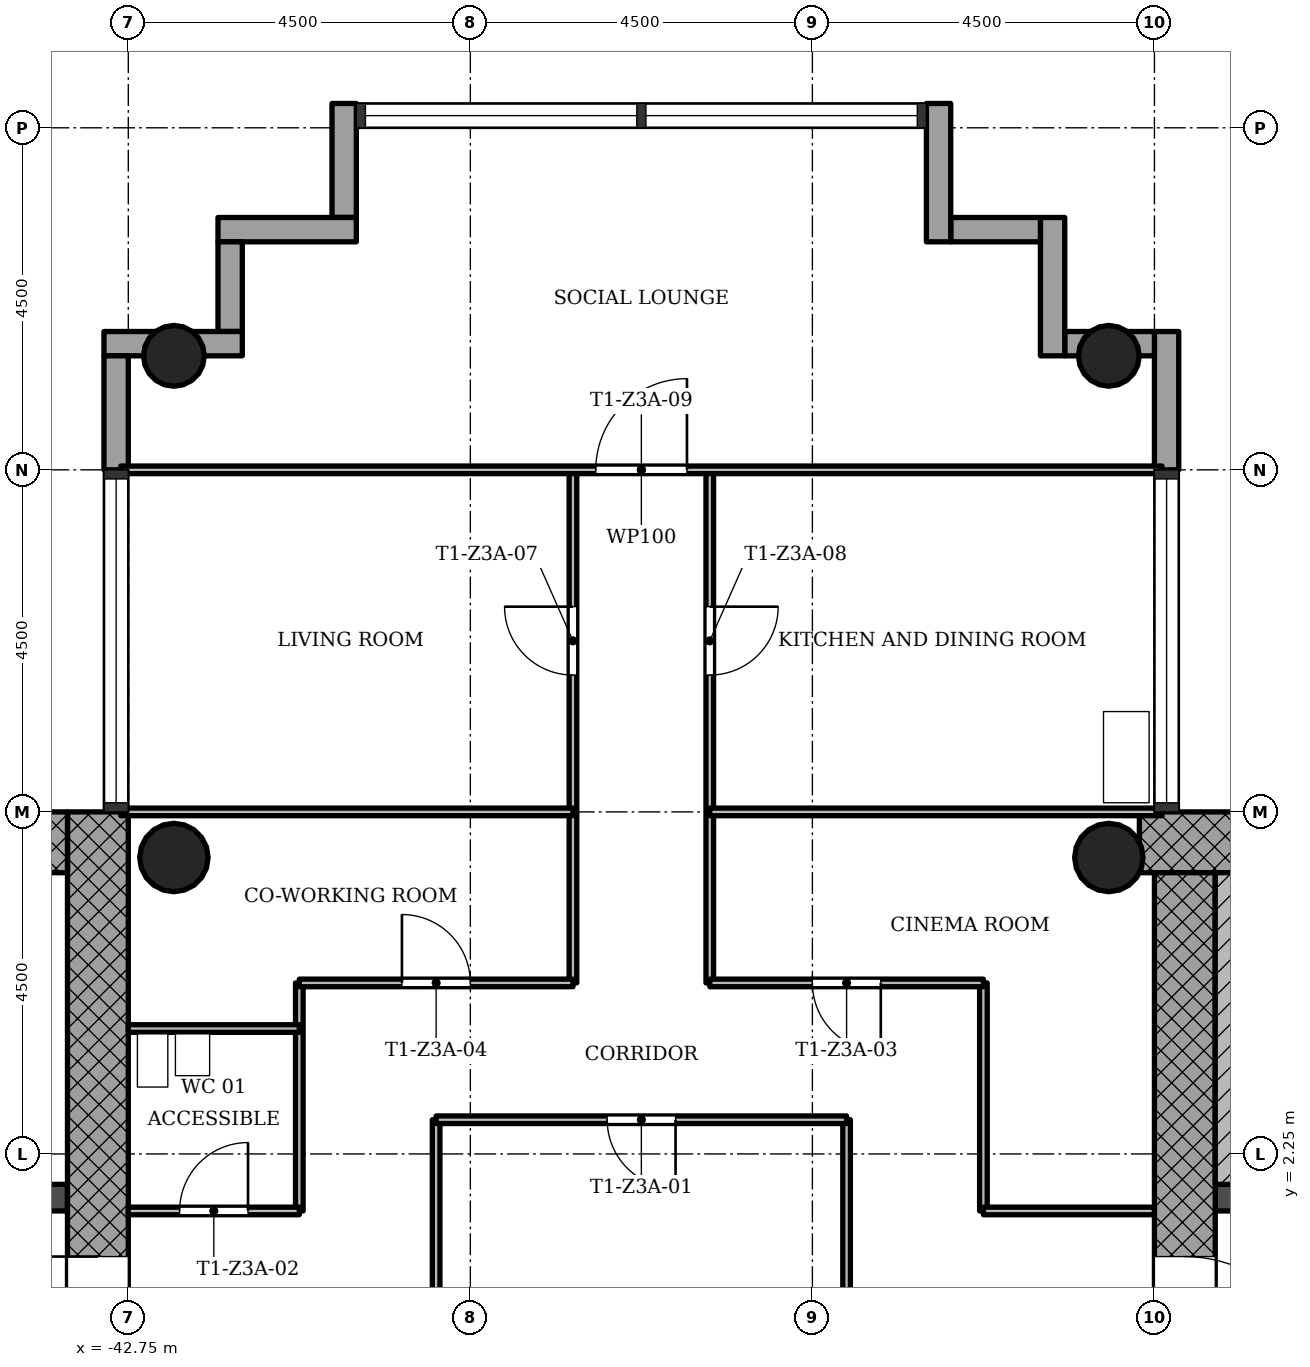
"""IFC4 building model, lengths in metres.
Left out: names, types, materials, properties, quantities, classifications, styles, units other than length and angle.
Written with IfcOpenShell. Run it as: python <this file> out.ifc"""

import sys

from ifc_helpers import new_model, si_unit, direction, frame, frame_2d, origin, origin_2d, place, context, subcontext, project, spatial, rectangle, hollow_circle, extrude, element, fill, save


model = new_model("IFC4")
c1 = context("Model", 3, precision=1e-05, world=origin(), true_north=direction((0.0, 1.0)))
c2 = subcontext(c1, "Body", "Model", "MODEL_VIEW")
j1 = project(units=[si_unit("LENGTHUNIT", "METRE"), si_unit("PLANEANGLEUNIT", "RADIAN")], contexts=[c1])
p1 = place(None, origin())
s1 = spatial("IfcSite", under=j1, at=p1, CompositionType="ELEMENT")
p2 = place(p1, origin())
s2 = spatial("IfcBuilding", under=s1, at=p2, CompositionType="ELEMENT")
p3 = place(p2, frame((0.0, 0.0, 140.5)))
s3 = spatial("IfcBuildingStorey", under=s2, at=p3, CompositionType="ELEMENT", Elevation=140.5)
p4 = place(p3, frame((-20.652, 6.35, 0.0), z_axis=(0.0, 0.0, 1.0), x_axis=(-1.0, 0.0, 0.0)))
e1 = element("IfcWall", 1, at=p4, inside=s3, PredefinedType="SHEAR", context=c2, shape_type="SweptSolid", body=[
    extrude(rectangle(XDim=8.796, YDim=0.8, at=frame_2d((4.398, 0.0))), origin(), (0.0, 0.0, 1.0), 3.4),
])
p5 = place(p3, frame((-28.85, 5.95, 0.0), z_axis=(0.0, 0.0, 1.0), x_axis=(0.0, -1.0, 0.0)))
e2 = element("IfcWall", 2, at=p5, inside=s3, PredefinedType="SHEAR", context=c2, shape_type="SweptSolid", body=[
    extrude(rectangle(XDim=12.7, YDim=0.8, at=frame_2d((6.35, 0.0))), origin(), (0.0, 0.0, 1.0), 3.4),
])
p6 = place(p5, frame((5.05, 0.0, 0.0)))
e3 = element("IfcOpeningElement", 3, at=p6, cuts=e2, PredefinedType="OPENING", context=c2, shape_type="SweptSolid", body=[
    extrude(rectangle(XDim=1.8, YDim=2.1, at=frame_2d((0.9, 1.05))), frame((0.0, 0.41, 0.0), z_axis=(0.0, -1.0, 0.0), x_axis=(1.0, 0.0, 0.0)), (0.0, 0.0, 1.0), 0.82),
])
p7 = place(p3, frame((-28.45, 1.675, 0.0), z_axis=(0.0, 0.0, 1.0), x_axis=(1.0, 0.0, 0.0)))
e4 = element("IfcWall", 4, at=p7, inside=s3, PredefinedType="SHEAR", context=c2, shape_type="SweptSolid", body=[
    extrude(rectangle(XDim=7.4, YDim=0.35, at=frame_2d((3.7, 0.0))), origin(), (0.0, 0.0, 1.0), 3.4),
])
p8 = place(p7, frame((0.85, 0.0, 0.0)))
e5 = element("IfcOpeningElement", 5, at=p8, cuts=e4, PredefinedType="OPENING", context=c2, shape_type="SweptSolid", body=[
    extrude(rectangle(XDim=0.9, YDim=2.1, at=frame_2d((0.45, 1.05))), frame((0.0, 0.185, 0.0), z_axis=(0.0, -1.0, 0.0), x_axis=(1.0, 0.0, 0.0)), (0.0, 0.0, 1.0), 0.37),
])
p9 = place(p3, frame((-43.15, -5.95, 0.0), z_axis=(0.0, 0.0, 1.0), x_axis=(0.0, 1.0, 0.0)))
e6 = element("IfcWall", 6, at=p9, inside=s3, PredefinedType="SHEAR", context=c2, shape_type="SweptSolid", body=[
    extrude(rectangle(XDim=12.7, YDim=0.8, at=frame_2d((6.35, 0.0))), origin(), (0.0, 0.0, 1.0), 3.4),
])
p10 = place(p9, frame((5.05, 0.0, 0.0)))
e7 = element("IfcOpeningElement", 7, at=p10, cuts=e6, PredefinedType="OPENING", context=c2, shape_type="SweptSolid", body=[
    extrude(rectangle(XDim=1.8, YDim=2.1, at=frame_2d((0.9, 1.05))), frame((0.0, 0.41, 0.0), z_axis=(0.0, -1.0, 0.0), x_axis=(1.0, 0.0, 0.0)), (0.0, 0.0, 1.0), 0.82),
])
p11 = place(p3, frame((-43.55, 6.35, 0.0), z_axis=(0.0, 0.0, 1.0), x_axis=(-1.0, 0.0, 0.0)))
e8 = element("IfcWall", 8, at=p11, inside=s3, PredefinedType="SHEAR", context=c2, shape_type="SweptSolid", body=[
    extrude(rectangle(XDim=8.2, YDim=0.8, at=frame_2d((4.1, 0.0))), origin(), (0.0, 0.0, 1.0), 3.4),
])
p12 = place(p3, frame((-50.95, 1.675, 0.0), z_axis=(0.0, 0.0, 1.0), x_axis=(1.0, 0.0, 0.0)))
e9 = element("IfcWall", 9, at=p12, inside=s3, PredefinedType="SHEAR", context=c2, shape_type="SweptSolid", body=[
    extrude(rectangle(XDim=7.4, YDim=0.35, at=frame_2d((3.7, 0.0))), origin(), (0.0, 0.0, 1.0), 3.4),
])
p13 = place(p12, frame((5.35, 0.0, 0.0)))
e10 = element("IfcOpeningElement", 10, at=p13, cuts=e9, PredefinedType="OPENING", context=c2, shape_type="SweptSolid", body=[
    extrude(rectangle(XDim=1.1, YDim=2.1, at=frame_2d((0.55, 1.05))), frame((0.0, 0.185, 0.0), z_axis=(0.0, -1.0, 0.0), x_axis=(1.0, 0.0, 0.0)), (0.0, 0.0, 1.0), 0.37),
])
p14 = place(p12, frame((1.0, 0.0, 0.0)))
e11 = element("IfcOpeningElement", 11, at=p14, cuts=e9, PredefinedType="OPENING", context=c2, shape_type="SweptSolid", body=[
    extrude(rectangle(XDim=1.1, YDim=2.1, at=frame_2d((0.55, 1.05))), frame((0.0, 0.185, 0.0), z_axis=(0.0, -1.0, 0.0), x_axis=(1.0, 0.0, 0.0)), (0.0, 0.0, 1.0), 0.37),
])
p15 = place(p12, frame((3.3, 0.0, 0.0)))
e12 = element("IfcOpeningElement", 12, at=p15, cuts=e9, PredefinedType="OPENING", context=c2, shape_type="SweptSolid", body=[
    extrude(rectangle(XDim=0.9, YDim=2.1, at=frame_2d((0.45, 1.05))), frame((0.0, 0.185, 0.0), z_axis=(0.0, -1.0, 0.0), x_axis=(1.0, 0.0, 0.0)), (0.0, 0.0, 1.0), 0.37),
])
for number, where, z_axis, x_axis in (
    (13, (-29.85, 12.75, 0.0), (0.0, 0.0, 1.0), (1.0, 0.0, 0.0)),
    (14, (-42.15, 12.75, 0.0), (0.0, 0.0, 1.0), (1.0, 0.0, 0.0)),
):
    element("IfcColumn", number, at=place(p3, frame(where, z_axis=z_axis, x_axis=x_axis)), inside=s3, PredefinedType="COLUMN", context=c2, shape_type="SweptSolid", body=[
        extrude(hollow_circle(Radius=0.4, WallThickness=0.028, at=origin_2d()), origin(), (0.0, 0.0, 1.0), 3.4),
    ])
for number, where, z_axis, x_axis in (
    (15, (-29.85, 6.15, 0.0), (0.0, 0.0, 1.0), (1.0, 0.0, 0.0)),
    (16, (-42.15, 6.15, 0.0), (0.0, 0.0, 1.0), (1.0, 0.0, 0.0)),
):
    element("IfcColumn", number, at=place(p3, frame(where, z_axis=z_axis, x_axis=x_axis)), inside=s3, PredefinedType="COLUMN", context=c2, shape_type="SweptSolid", body=[
        extrude(hollow_circle(Radius=0.45, WallThickness=0.032, at=origin_2d()), origin(), (0.0, 0.0, 1.0), 3.4),
    ])
p16 = place(p3, frame((-29.09, 11.25, -0.3), z_axis=(0.0, 0.0, 1.0), x_axis=(0.0, 1.0, 0.0)))
e17 = element("IfcWall", 17, at=p16, inside=s3, PredefinedType="STANDARD", context=c2, shape_type="SweptSolid", body=[
    extrude(rectangle(XDim=1.82, YDim=0.32, at=frame_2d((0.91, 0.0))), origin(), (0.0, 0.0, 1.0), 3.4),
])
p17 = place(p3, frame((-29.25, 12.91, -0.3), z_axis=(0.0, 0.0, 1.0), x_axis=(-1.0, 0.0, 0.0)))
e18 = element("IfcWall", 18, at=p17, inside=s3, PredefinedType="STANDARD", context=c2, shape_type="SweptSolid", body=[
    extrude(rectangle(XDim=1.18, YDim=0.32, at=frame_2d((0.59, 0.0))), origin(), (0.0, 0.0, 1.0), 3.4),
])
p18 = place(p3, frame((-30.59, 12.75, -0.3), z_axis=(0.0, 0.0, 1.0), x_axis=(0.0, 1.0, 0.0)))
e19 = element("IfcWall", 19, at=p18, inside=s3, PredefinedType="STANDARD", context=c2, shape_type="SweptSolid", body=[
    extrude(rectangle(XDim=1.82, YDim=0.32, at=frame_2d((0.91, 0.0))), origin(), (0.0, 0.0, 1.0), 3.4),
])
p19 = place(p3, frame((-30.75, 14.41, -0.3), z_axis=(0.0, 0.0, 1.0), x_axis=(-1.0, 0.0, 0.0)))
e20 = element("IfcWall", 20, at=p19, inside=s3, PredefinedType="STANDARD", context=c2, shape_type="SweptSolid", body=[
    extrude(rectangle(XDim=1.18, YDim=0.32, at=frame_2d((0.59, 0.0))), origin(), (0.0, 0.0, 1.0), 3.4),
])
p20 = place(p3, frame((-32.09, 14.25, -0.3), z_axis=(0.0, 0.0, 1.0), x_axis=(0.0, 1.0, 0.0)))
e21 = element("IfcWall", 21, at=p20, inside=s3, PredefinedType="STANDARD", context=c2, shape_type="SweptSolid", body=[
    extrude(rectangle(XDim=1.82, YDim=0.32, at=frame_2d((0.91, 0.0))), origin(), (0.0, 0.0, 1.0), 3.4),
])
p21 = place(p3, frame((-39.91, 16.07, -0.3), z_axis=(0.0, 0.0, 1.0), x_axis=(0.0, -1.0, 0.0)))
e22 = element("IfcWall", 22, at=p21, inside=s3, PredefinedType="STANDARD", context=c2, shape_type="SweptSolid", body=[
    extrude(rectangle(XDim=1.5, YDim=0.32, at=frame_2d((0.75, 0.0))), origin(), (0.0, 0.0, 1.0), 3.4),
])
p22 = place(p3, frame((-39.75, 14.41, -0.3), z_axis=(0.0, 0.0, 1.0), x_axis=(-1.0, 0.0, 0.0)))
e23 = element("IfcWall", 23, at=p22, inside=s3, PredefinedType="STANDARD", context=c2, shape_type="SweptSolid", body=[
    extrude(rectangle(XDim=1.82, YDim=0.32, at=frame_2d((0.91, 0.0))), origin(), (0.0, 0.0, 1.0), 3.4),
])
p23 = place(p3, frame((-41.41, 14.25, -0.3), z_axis=(0.0, 0.0, 1.0), x_axis=(0.0, -1.0, 0.0)))
e24 = element("IfcWall", 24, at=p23, inside=s3, PredefinedType="STANDARD", context=c2, shape_type="SweptSolid", body=[
    extrude(rectangle(XDim=1.18, YDim=0.32, at=frame_2d((0.59, 0.0))), origin(), (0.0, 0.0, 1.0), 3.4),
])
p24 = place(p3, frame((-41.25, 12.91, -0.3), z_axis=(0.0, 0.0, 1.0), x_axis=(-1.0, 0.0, 0.0)))
e25 = element("IfcWall", 25, at=p24, inside=s3, PredefinedType="STANDARD", context=c2, shape_type="SweptSolid", body=[
    extrude(rectangle(XDim=1.82, YDim=0.32, at=frame_2d((0.91, 0.0))), origin(), (0.0, 0.0, 1.0), 3.4),
])
p25 = place(p3, frame((-42.91, 12.75, -0.3), z_axis=(0.0, 0.0, 1.0), x_axis=(0.0, -1.0, 0.0)))
e26 = element("IfcWall", 26, at=p25, inside=s3, PredefinedType="STANDARD", context=c2, shape_type="SweptSolid", body=[
    extrude(rectangle(XDim=1.5, YDim=0.32, at=frame_2d((0.75, 0.0))), origin(), (0.0, 0.0, 1.0), 3.4),
])
p26 = place(p3, frame((-40.5, 1.5, 0.0), z_axis=(0.0, 0.0, 1.0), x_axis=(0.0, 1.0, 0.0)))
e27 = element("IfcWall", 27, at=p26, inside=s3, PredefinedType="PARTITIONING", context=c2, shape_type="SweptSolid", body=[
    extrude(rectangle(XDim=3.0, YDim=0.1, at=frame_2d((1.5, 0.0))), origin(), (0.0, 0.0, 1.0), 3.0),
])
p27 = place(p3, frame((-38.7, -2.7, 0.0), z_axis=(0.0, 0.0, 1.0), x_axis=(0.0, 1.0, 0.0)))
e28 = element("IfcWall", 28, at=p27, inside=s3, PredefinedType="PARTITIONING", context=c2, shape_type="SweptSolid", body=[
    extrude(rectangle(XDim=5.4, YDim=0.1, at=frame_2d((2.7, 0.0))), origin(), (0.0, 0.0, 1.0), 3.0),
])
p28 = place(p3, frame((-36.9, 4.5, 0.0), z_axis=(0.0, 0.0, 1.0), x_axis=(0.0, 1.0, 0.0)))
e29 = element("IfcWall", 29, at=p28, inside=s3, PredefinedType="PARTITIONING", context=c2, shape_type="SweptSolid", body=[
    extrude(rectangle(XDim=6.75, YDim=0.1, at=frame_2d((3.375, 0.0))), origin(), (0.0, 0.0, 1.0), 3.0),
])
p29 = place(p28, frame((4.05, 0.0, 0.0)))
e30 = element("IfcOpeningElement", 30, at=p29, cuts=e29, PredefinedType="OPENING", context=c2, shape_type="SweptSolid", body=[
    extrude(rectangle(XDim=0.9, YDim=2.1, at=frame_2d((0.45, 1.05))), frame((0.0, 0.06, 0.0), z_axis=(0.0, -1.0, 0.0), x_axis=(1.0, 0.0, 0.0)), (0.0, 0.0, 1.0), 0.12),
])
p30 = place(p3, frame((-35.1, 4.5, 0.0), z_axis=(0.0, 0.0, 1.0), x_axis=(0.0, 1.0, 0.0)))
e31 = element("IfcWall", 31, at=p30, inside=s3, PredefinedType="PARTITIONING", context=c2, shape_type="SweptSolid", body=[
    extrude(rectangle(XDim=6.75, YDim=0.1, at=frame_2d((3.375, 0.0))), origin(), (0.0, 0.0, 1.0), 3.0),
])
p31 = place(p30, frame((4.05, 0.0, 0.0)))
e32 = element("IfcOpeningElement", 32, at=p31, cuts=e31, PredefinedType="OPENING", context=c2, shape_type="SweptSolid", body=[
    extrude(rectangle(XDim=0.9, YDim=2.1, at=frame_2d((0.45, 1.05))), frame((0.0, 0.06, 0.0), z_axis=(0.0, -1.0, 0.0), x_axis=(1.0, 0.0, 0.0)), (0.0, 0.0, 1.0), 0.12),
])
p32 = place(p3, frame((-33.3, -2.7, 0.0), z_axis=(0.0, 0.0, 1.0), x_axis=(0.0, 1.0, 0.0)))
e33 = element("IfcWall", 33, at=p32, inside=s3, PredefinedType="PARTITIONING", context=c2, shape_type="SweptSolid", body=[
    extrude(rectangle(XDim=5.4, YDim=0.1, at=frame_2d((2.7, 0.0))), origin(), (0.0, 0.0, 1.0), 3.0),
])
p33 = place(p3, frame((-31.5, 1.5, 0.0), z_axis=(0.0, 0.0, 1.0), x_axis=(0.0, 1.0, 0.0)))
e34 = element("IfcWall", 34, at=p33, inside=s3, PredefinedType="PARTITIONING", context=c2, shape_type="SweptSolid", body=[
    extrude(rectangle(XDim=3.0, YDim=0.1, at=frame_2d((1.5, 0.0))), origin(), (0.0, 0.0, 1.0), 3.0),
])
p34 = place(p3, frame((-42.75, 1.5, 0.0), z_axis=(0.0, 0.0, 1.0), x_axis=(1.0, 0.0, 0.0)))
e35 = element("IfcWall", 35, at=p34, inside=s3, PredefinedType="PARTITIONING", context=c2, shape_type="SweptSolid", body=[
    extrude(rectangle(XDim=2.25, YDim=0.1, at=frame_2d((1.125, 0.0))), origin(), (0.0, 0.0, 1.0), 3.0),
])
p35 = place(p34, frame((0.675, 0.0, 0.0)))
e36 = element("IfcOpeningElement", 36, at=p35, cuts=e35, PredefinedType="OPENING", context=c2, shape_type="SweptSolid", body=[
    extrude(rectangle(XDim=0.9, YDim=2.1, at=frame_2d((0.45, 1.05))), frame((0.0, 0.06, 0.0), z_axis=(0.0, -1.0, 0.0), x_axis=(1.0, 0.0, 0.0)), (0.0, 0.0, 1.0), 0.12),
])
p36 = place(p3, frame((-31.5, 1.5, 0.0), z_axis=(0.0, 0.0, 1.0), x_axis=(1.0, 0.0, 0.0)))
e37 = element("IfcWall", 37, at=p36, inside=s3, PredefinedType="PARTITIONING", context=c2, shape_type="SweptSolid", body=[
    extrude(rectangle(XDim=2.25, YDim=0.1, at=frame_2d((1.125, 0.0))), origin(), (0.0, 0.0, 1.0), 3.0),
])
p37 = place(p3, frame((-38.7, 2.7, 0.0), z_axis=(0.0, 0.0, 1.0), x_axis=(1.0, 0.0, 0.0)))
e38 = element("IfcWall", 38, at=p37, inside=s3, PredefinedType="PARTITIONING", context=c2, shape_type="SweptSolid", body=[
    extrude(rectangle(XDim=5.4, YDim=0.1, at=frame_2d((2.7, 0.0))), origin(), (0.0, 0.0, 1.0), 3.0),
])
p38 = place(p37, frame((2.25, 0.0, 0.0)))
e39 = element("IfcOpeningElement", 39, at=p38, cuts=e38, PredefinedType="OPENING", context=c2, shape_type="SweptSolid", body=[
    extrude(rectangle(XDim=0.9, YDim=2.1, at=frame_2d((0.45, 1.05))), frame((0.0, 0.06, 0.0), z_axis=(0.0, -1.0, 0.0), x_axis=(1.0, 0.0, 0.0)), (0.0, 0.0, 1.0), 0.12),
])
p39 = place(p3, frame((-42.75, 3.9, 0.0), z_axis=(0.0, 0.0, 1.0), x_axis=(1.0, 0.0, 0.0)))
e40 = element("IfcWall", 40, at=p39, inside=s3, PredefinedType="PARTITIONING", context=c2, shape_type="SweptSolid", body=[
    extrude(rectangle(XDim=2.25, YDim=0.1, at=frame_2d((1.125, 0.0))), origin(), (0.0, 0.0, 1.0), 3.0),
])
p40 = place(p3, frame((-40.5, 4.5, 0.0), z_axis=(0.0, 0.0, 1.0), x_axis=(1.0, 0.0, 0.0)))
e41 = element("IfcWall", 41, at=p40, inside=s3, PredefinedType="PARTITIONING", context=c2, shape_type="SweptSolid", body=[
    extrude(rectangle(XDim=3.6, YDim=0.1, at=frame_2d((1.8, 0.0))), origin(), (0.0, 0.0, 1.0), 3.0),
])
p41 = place(p40, frame((1.35, 0.0, 0.0)))
e42 = element("IfcOpeningElement", 42, at=p41, cuts=e41, PredefinedType="OPENING", context=c2, shape_type="SweptSolid", body=[
    extrude(rectangle(XDim=0.9, YDim=2.1, at=frame_2d((0.45, 1.05))), frame((0.0, 0.06, 0.0), z_axis=(0.0, -1.0, 0.0), x_axis=(1.0, 0.0, 0.0)), (0.0, 0.0, 1.0), 0.12),
])
p42 = place(p3, frame((-35.1, 4.5, 0.0), z_axis=(0.0, 0.0, 1.0), x_axis=(1.0, 0.0, 0.0)))
e43 = element("IfcWall", 43, at=p42, inside=s3, PredefinedType="PARTITIONING", context=c2, shape_type="SweptSolid", body=[
    extrude(rectangle(XDim=3.6, YDim=0.1, at=frame_2d((1.8, 0.0))), origin(), (0.0, 0.0, 1.0), 3.0),
])
p43 = place(p42, frame((1.35, 0.0, 0.0)))
e44 = element("IfcOpeningElement", 44, at=p43, cuts=e43, PredefinedType="OPENING", context=c2, shape_type="SweptSolid", body=[
    extrude(rectangle(XDim=0.9, YDim=2.1, at=frame_2d((0.45, 1.05))), frame((0.0, 0.06, 0.0), z_axis=(0.0, -1.0, 0.0), x_axis=(1.0, 0.0, 0.0)), (0.0, 0.0, 1.0), 0.12),
])
for number, where, z_axis, x_axis in (
    (45, (-42.85, 6.75, 0.0), (0.0, 0.0, 1.0), (1.0, 0.0, 0.0)),
    (46, (-35.1, 6.75, 0.0), (0.0, 0.0, 1.0), (1.0, 0.0, 0.0)),
):
    element("IfcWall", number, at=place(p3, frame(where, z_axis=z_axis, x_axis=x_axis)), inside=s3, PredefinedType="PARTITIONING", context=c2, shape_type="SweptSolid", body=[
        extrude(rectangle(XDim=5.95, YDim=0.1, at=frame_2d((2.975, 0.0))), origin(), (0.0, 0.0, 1.0), 3.0),
    ])
p44 = place(p3, frame((-42.85, 11.25, 0.0), z_axis=(0.0, 0.0, 1.0), x_axis=(1.0, 0.0, 0.0)))
e47 = element("IfcWall", 47, at=p44, inside=s3, PredefinedType="PARTITIONING", context=c2, shape_type="SweptSolid", body=[
    extrude(rectangle(XDim=13.7, YDim=0.1, at=frame_2d((6.85, 0.0))), origin(), (0.0, 0.0, 1.0), 3.0),
])
p45 = place(p44, frame((6.25, 0.0, 0.0)))
e48 = element("IfcOpeningElement", 48, at=p45, cuts=e47, PredefinedType="OPENING", context=c2, shape_type="SweptSolid", body=[
    extrude(rectangle(XDim=1.2, YDim=2.1, at=frame_2d((0.6, 1.05))), frame((0.0, 0.06, 0.0), z_axis=(0.0, -1.0, 0.0), x_axis=(1.0, 0.0, 0.0)), (0.0, 0.0, 1.0), 0.12),
])
p46 = place(p3, frame((-28.25, 1.85, 0.0), z_axis=(0.0, 0.0, 1.0), x_axis=(0.0, 1.0, 0.0)))
e49 = element("IfcWall", 49, at=p46, inside=s3, PredefinedType="SHEAR", context=c2, shape_type="SweptSolid", body=[
    extrude(rectangle(XDim=4.1, YDim=0.4, at=frame_2d((2.05, 0.0))), origin(), (0.0, 0.0, 1.0), 3.4),
])
p47 = place(p38, origin())
e50 = element("IfcDoor", 50, at=p47, inside=s3, OperationType="SINGLE_SWING_RIGHT", PredefinedType="DOOR", context=c2, shape_type="SweptSolid", body=[
    extrude(rectangle(XDim=0.9, YDim=2.1, at=frame_2d((0.45, 1.05))), frame((0.0, 0.025, 0.0), z_axis=(0.0, -1.0, 0.0), x_axis=(1.0, 0.0, 0.0)), (0.0, 0.0, 1.0), 0.05),
])
fill(e39, e50)
p48 = place(p35, origin())
e51 = element("IfcDoor", 51, at=p48, inside=s3, OperationType="SINGLE_SWING_LEFT", PredefinedType="DOOR", context=c2, shape_type="SweptSolid", body=[
    extrude(rectangle(XDim=0.9, YDim=2.1, at=frame_2d((0.45, 1.05))), frame((0.0, 0.025, 0.0), z_axis=(0.0, -1.0, 0.0), x_axis=(1.0, 0.0, 0.0)), (0.0, 0.0, 1.0), 0.05),
])
fill(e36, e51)
p49 = place(p43, origin())
e52 = element("IfcDoor", 52, at=p49, inside=s3, OperationType="SINGLE_SWING_RIGHT", PredefinedType="DOOR", context=c2, shape_type="SweptSolid", body=[
    extrude(rectangle(XDim=0.9, YDim=2.1, at=frame_2d((0.45, 1.05))), frame((0.0, 0.025, 0.0), z_axis=(0.0, -1.0, 0.0), x_axis=(1.0, 0.0, 0.0)), (0.0, 0.0, 1.0), 0.05),
])
fill(e44, e52)
p50 = place(p41, origin())
e53 = element("IfcDoor", 53, at=p50, inside=s3, OperationType="SINGLE_SWING_RIGHT", PredefinedType="DOOR", context=c2, shape_type="SweptSolid", body=[
    extrude(rectangle(XDim=0.9, YDim=2.1, at=frame_2d((0.45, 1.05))), frame((0.0, 0.025, 0.0), z_axis=(0.0, -1.0, 0.0), x_axis=(1.0, 0.0, 0.0)), (0.0, 0.0, 1.0), 0.05),
])
fill(e42, e53)
p51 = place(p29, origin())
e54 = element("IfcDoor", 54, at=p51, inside=s3, OperationType="SINGLE_SWING_LEFT", PredefinedType="DOOR", context=c2, shape_type="SweptSolid", body=[
    extrude(rectangle(XDim=0.9, YDim=2.1, at=frame_2d((0.45, 1.05))), frame((0.0, 0.025, 0.0), z_axis=(0.0, -1.0, 0.0), x_axis=(1.0, 0.0, 0.0)), (0.0, 0.0, 1.0), 0.05),
])
fill(e30, e54)
p52 = place(p31, origin())
e55 = element("IfcDoor", 55, at=p52, inside=s3, OperationType="SINGLE_SWING_RIGHT", PredefinedType="DOOR", context=c2, shape_type="SweptSolid", body=[
    extrude(rectangle(XDim=0.9, YDim=2.1, at=frame_2d((0.45, 1.05))), frame((0.0, 0.025, 0.0), z_axis=(0.0, -1.0, 0.0), x_axis=(1.0, 0.0, 0.0)), (0.0, 0.0, 1.0), 0.05),
])
fill(e32, e55)
p53 = place(p45, origin())
e56 = element("IfcDoor", 56, at=p53, inside=s3, OperationType="SINGLE_SWING_LEFT", PredefinedType="DOOR", context=c2, shape_type="SweptSolid", body=[
    extrude(rectangle(XDim=1.2, YDim=2.1, at=frame_2d((0.6, 1.05))), frame((0.0, 0.025, 0.0), z_axis=(0.0, -1.0, 0.0), x_axis=(1.0, 0.0, 0.0)), (0.0, 0.0, 1.0), 0.05),
])
fill(e48, e56)
p54 = place(p6, origin())
e57 = element("IfcDoor", 57, at=p54, inside=s3, OperationType="SINGLE_SWING_LEFT", PredefinedType="DOOR", context=c2, shape_type="SweptSolid", body=[
    extrude(rectangle(XDim=1.8, YDim=2.1, at=frame_2d((0.9, 1.05))), frame((0.0, 0.025, 0.0), z_axis=(0.0, -1.0, 0.0), x_axis=(1.0, 0.0, 0.0)), (0.0, 0.0, 1.0), 0.05),
])
fill(e3, e57)
p55 = place(p10, origin())
e58 = element("IfcDoor", 58, at=p55, inside=s3, OperationType="SINGLE_SWING_LEFT", PredefinedType="DOOR", context=c2, shape_type="SweptSolid", body=[
    extrude(rectangle(XDim=1.8, YDim=2.1, at=frame_2d((0.9, 1.05))), frame((0.0, 0.025, 0.0), z_axis=(0.0, -1.0, 0.0), x_axis=(1.0, 0.0, 0.0)), (0.0, 0.0, 1.0), 0.05),
])
fill(e7, e58)
save(model, sys.argv[1])
